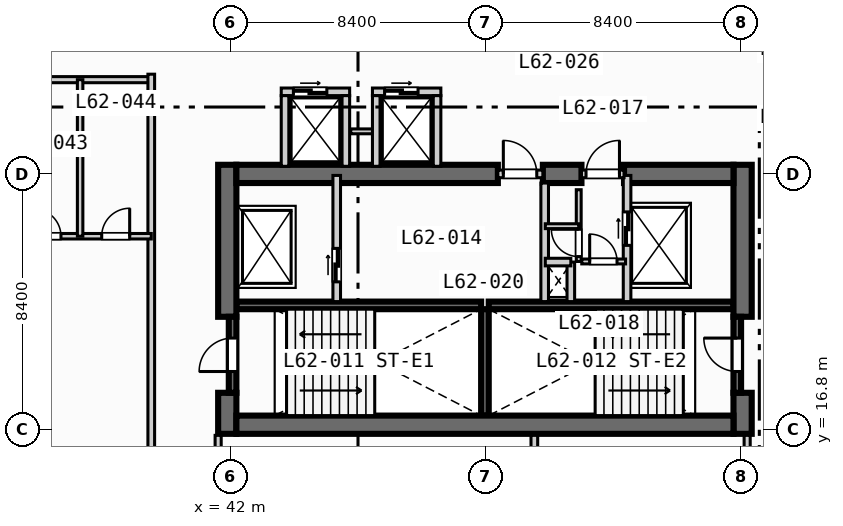
"""IFC4 building model, lengths in metres.
Left out: names, types, materials, properties, quantities, classifications, styles, units other than length and angle.
Written with IfcOpenShell. Run it as: python <this file> out.ifc"""

import sys

from ifc_helpers import new_model, si_unit, direction, frame, frame_2d, origin, place, context, subcontext, project, spatial, rectangle, extrude, element, fill, save


model = new_model("IFC4")
c1 = context("Model", 3, precision=1e-05, world=origin(), true_north=direction((0.0, 1.0)))
c2 = subcontext(c1, "Body", "Model", "MODEL_VIEW")
j1 = project(units=[si_unit("LENGTHUNIT", "METRE"), si_unit("PLANEANGLEUNIT", "RADIAN")], contexts=[c1])
p1 = place(None, origin())
s1 = spatial("IfcSite", under=j1, at=p1, CompositionType="ELEMENT")
p2 = place(p1, origin())
s2 = spatial("IfcBuilding", under=s1, at=p2, CompositionType="ELEMENT")
p3 = place(p2, frame((0.0, 0.0, 252.7)))
s3 = spatial("IfcBuildingStorey", under=s2, at=p3, CompositionType="ELEMENT", Elevation=252.7)
for number, where, z_axis, x_axis in (
    (1, (42.2, 20.875, 0.0), (0.0, 0.0, 1.0), (1.0, 0.0, 0.0)),
    (2, (50.5, 20.875, 0.0), (0.0, 0.0, 1.0), (1.0, 0.0, 0.0)),
):
    element("IfcWall", number, at=place(p3, frame(where, z_axis=z_axis, x_axis=x_axis)), inside=s3, PredefinedType="SOLIDWALL", context=c2, shape_type="SweptSolid", body=[
        extrude(rectangle(XDim=8.05, YDim=0.25, at=frame_2d((4.025, 0.0))), origin(), (0.0, 0.0, 1.0), 3.47),
    ])
p4 = place(p3, frame((50.375, 17.25, 0.0), z_axis=(0.0, 0.0, 1.0), x_axis=(0.0, 1.0, 0.0)))
e3 = element("IfcWall", 3, at=p4, inside=s3, PredefinedType="SOLIDWALL", context=c2, shape_type="SweptSolid", body=[
    extrude(rectangle(XDim=3.5, YDim=0.25, at=frame_2d((1.75, 0.0))), origin(), (0.0, 0.0, 1.0), 3.47),
])
p5 = place(p3, frame((41.9, 16.65, 0.0), z_axis=(0.0, 0.0, 1.0), x_axis=(0.0, 1.0, 0.0)))
e4 = element("IfcWall", 4, at=p5, inside=s3, PredefinedType="SHEAR", context=c2, shape_type="SweptSolid", body=[
    extrude(rectangle(XDim=1.35, YDim=0.6, at=frame_2d((0.675, 0.0))), origin(), (0.0, 0.0, 1.0), 3.47),
])
p6 = place(p3, frame((41.9, 20.5, 0.0), z_axis=(0.0, 0.0, 1.0), x_axis=(0.0, 1.0, 0.0)))
e5 = element("IfcWall", 5, at=p6, inside=s3, PredefinedType="SHEAR", context=c2, shape_type="SweptSolid", body=[
    extrude(rectangle(XDim=5.0, YDim=0.6, at=frame_2d((2.5, 0.0))), origin(), (0.0, 0.0, 1.0), 3.47),
])
p7 = place(p3, frame((58.85, 16.65, 0.0), z_axis=(0.0, 0.0, 1.0), x_axis=(0.0, 1.0, 0.0)))
e6 = element("IfcWall", 6, at=p7, inside=s3, PredefinedType="SHEAR", context=c2, shape_type="SweptSolid", body=[
    extrude(rectangle(XDim=1.35, YDim=0.6, at=frame_2d((0.675, 0.0))), origin(), (0.0, 0.0, 1.0), 3.47),
])
p8 = place(p3, frame((58.85, 20.5, 0.0), z_axis=(0.0, 0.0, 1.0), x_axis=(0.0, 1.0, 0.0)))
e7 = element("IfcWall", 7, at=p8, inside=s3, PredefinedType="SHEAR", context=c2, shape_type="SweptSolid", body=[
    extrude(rectangle(XDim=5.0, YDim=0.6, at=frame_2d((2.5, 0.0))), origin(), (0.0, 0.0, 1.0), 3.47),
])
p9 = place(p3, frame((42.2, 16.95, 0.0), z_axis=(0.0, 0.0, 1.0), x_axis=(1.0, 0.0, 0.0)))
e8 = element("IfcWall", 8, at=p9, inside=s3, PredefinedType="SHEAR", context=c2, shape_type="SweptSolid", body=[
    extrude(rectangle(XDim=16.35, YDim=0.6, at=frame_2d((8.175, 0.0))), origin(), (0.0, 0.0, 1.0), 3.47),
])
p10 = place(p3, frame((42.2, 25.2, 0.0), z_axis=(0.0, 0.0, 1.0), x_axis=(1.0, 0.0, 0.0)))
e9 = element("IfcWall", 9, at=p10, inside=s3, PredefinedType="SHEAR", context=c2, shape_type="SweptSolid", body=[
    extrude(rectangle(XDim=8.6, YDim=0.6, at=frame_2d((4.3, 0.0))), origin(), (0.0, 0.0, 1.0), 3.47),
])
p11 = place(p3, frame((52.28, 25.2, 0.0), z_axis=(0.0, 0.0, 1.0), x_axis=(1.0, 0.0, 0.0)))
e10 = element("IfcWall", 10, at=p11, inside=s3, PredefinedType="SHEAR", context=c2, shape_type="SweptSolid", body=[
    extrude(rectangle(XDim=1.27, YDim=0.6, at=frame_2d((0.635, 0.0))), origin(), (0.0, 0.0, 1.0), 3.47),
])
p12 = place(p3, frame((54.95, 25.2, 0.0), z_axis=(0.0, 0.0, 1.0), x_axis=(1.0, 0.0, 0.0)))
e11 = element("IfcWall", 11, at=p12, inside=s3, PredefinedType="SHEAR", context=c2, shape_type="SweptSolid", body=[
    extrude(rectangle(XDim=3.6, YDim=0.6, at=frame_2d((1.8, 0.0))), origin(), (0.0, 0.0, 1.0), 3.47),
])
p13 = place(p3, frame((42.075, 18.0, 0.0), z_axis=(0.0, 0.0, 1.0), x_axis=(0.0, 1.0, 0.0)))
e12 = element("IfcWall", 12, at=p13, inside=s3, PredefinedType="SOLIDWALL", context=c2, shape_type="SweptSolid", body=[
    extrude(rectangle(XDim=2.5, YDim=0.25, at=frame_2d((1.25, 0.0))), origin(), (0.0, 0.0, 1.0), 3.47),
])
p14 = place(p13, frame((0.7, 0.0, 0.0)))
e13 = element("IfcOpeningElement", 13, at=p14, cuts=e12, PredefinedType="OPENING", context=c2, shape_type="SweptSolid", body=[
    extrude(rectangle(XDim=1.1, YDim=2.15, at=frame_2d((0.55, 1.075))), frame((0.0, 0.135, 0.0), z_axis=(0.0, -1.0, 0.0), x_axis=(1.0, 0.0, 0.0)), (0.0, 0.0, 1.0), 0.27),
])
p15 = place(p3, frame((58.675, 18.0, 0.0), z_axis=(0.0, 0.0, 1.0), x_axis=(0.0, 1.0, 0.0)))
e14 = element("IfcWall", 14, at=p15, inside=s3, PredefinedType="SOLIDWALL", context=c2, shape_type="SweptSolid", body=[
    extrude(rectangle(XDim=2.5, YDim=0.25, at=frame_2d((1.25, 0.0))), origin(), (0.0, 0.0, 1.0), 3.47),
])
p16 = place(p15, frame((0.7, 0.0, 0.0)))
e15 = element("IfcOpeningElement", 15, at=p16, cuts=e14, PredefinedType="OPENING", context=c2, shape_type="SweptSolid", body=[
    extrude(rectangle(XDim=1.1, YDim=2.15, at=frame_2d((0.55, 1.075))), frame((0.0, 0.135, 0.0), z_axis=(0.0, -1.0, 0.0), x_axis=(1.0, 0.0, 0.0)), (0.0, 0.0, 1.0), 0.27),
])
p17 = place(p3, frame((45.5, 21.0, 0.0), z_axis=(0.0, 0.0, 1.0), x_axis=(0.0, 1.0, 0.0)))
e16 = element("IfcWall", 16, at=p17, inside=s3, PredefinedType="SOLIDWALL", context=c2, shape_type="SweptSolid", body=[
    extrude(rectangle(XDim=4.15, YDim=0.25, at=frame_2d((2.075, 0.0))), origin(), (0.0, 0.0, 1.0), 3.47),
])
p18 = place(p17, frame((0.65, 0.0, 0.0)))
e17 = element("IfcOpeningElement", 17, at=p18, cuts=e16, PredefinedType="OPENING", context=c2, shape_type="SweptSolid", body=[
    extrude(rectangle(XDim=1.1, YDim=2.15, at=frame_2d((0.55, 1.075))), frame((0.0, 0.135, 0.0), z_axis=(0.0, -1.0, 0.0), x_axis=(1.0, 0.0, 0.0)), (0.0, 0.0, 1.0), 0.27),
])
p19 = place(p3, frame((50.8, 25.2, 0.0), z_axis=(0.0, 0.0, 1.0), x_axis=(1.0, 0.0, 0.0)))
e18 = element("IfcWall", 18, at=p19, inside=s3, PredefinedType="SOLIDWALL", context=c2, shape_type="SweptSolid", body=[
    extrude(rectangle(XDim=1.48, YDim=0.25, at=frame_2d((0.74, 0.0))), origin(), (0.0, 0.0, 1.0), 3.47),
])
p20 = place(p19, frame((0.18, 0.0, 0.0)))
e19 = element("IfcOpeningElement", 19, at=p20, cuts=e18, PredefinedType="OPENING", context=c2, shape_type="SweptSolid", body=[
    extrude(rectangle(XDim=1.1, YDim=2.15, at=frame_2d((0.55, 1.075))), frame((0.0, 0.135, 0.0), z_axis=(0.0, -1.0, 0.0), x_axis=(1.0, 0.0, 0.0)), (0.0, 0.0, 1.0), 0.27),
])
p21 = place(p3, frame((52.34, 21.0, 0.0), z_axis=(0.0, 0.0, 1.0), x_axis=(0.0, 1.0, 0.0)))
e20 = element("IfcWall", 20, at=p21, inside=s3, PredefinedType="SOLIDWALL", context=c2, shape_type="SweptSolid", body=[
    extrude(rectangle(XDim=3.9, YDim=0.25, at=frame_2d((1.95, 0.0))), origin(), (0.0, 0.0, 1.0), 3.47),
])
p22 = place(p3, frame((55.05, 21.0, 0.0), z_axis=(0.0, 0.0, 1.0), x_axis=(0.0, 1.0, 0.0)))
e21 = element("IfcWall", 21, at=p22, inside=s3, PredefinedType="SOLIDWALL", context=c2, shape_type="SweptSolid", body=[
    extrude(rectangle(XDim=4.15, YDim=0.25, at=frame_2d((2.075, 0.0))), origin(), (0.0, 0.0, 1.0), 3.47),
])
p23 = place(p22, frame((1.85, 0.0, 0.0)))
e22 = element("IfcOpeningElement", 22, at=p23, cuts=e21, PredefinedType="OPENING", context=c2, shape_type="SweptSolid", body=[
    extrude(rectangle(XDim=1.1, YDim=2.15, at=frame_2d((0.55, 1.075))), frame((0.0, 0.135, 0.0), z_axis=(0.0, -1.0, 0.0), x_axis=(1.0, 0.0, 0.0)), (0.0, 0.0, 1.0), 0.27),
])
p24 = place(p3, frame((53.55, 25.2, 0.0), z_axis=(0.0, 0.0, 1.0), x_axis=(1.0, 0.0, 0.0)))
e23 = element("IfcWall", 23, at=p24, inside=s3, PredefinedType="SOLIDWALL", context=c2, shape_type="SweptSolid", body=[
    extrude(rectangle(XDim=1.4, YDim=0.25, at=frame_2d((0.7, 0.0))), origin(), (0.0, 0.0, 1.0), 3.47),
])
p25 = place(p24, frame((0.15, 0.0, 0.0)))
e24 = element("IfcOpeningElement", 24, at=p25, cuts=e23, PredefinedType="OPENING", context=c2, shape_type="SweptSolid", body=[
    extrude(rectangle(XDim=1.1, YDim=2.15, at=frame_2d((0.55, 1.075))), frame((0.0, 0.135, 0.0), z_axis=(0.0, -1.0, 0.0), x_axis=(1.0, 0.0, 0.0)), (0.0, 0.0, 1.0), 0.27),
])
p26 = place(p3, frame((53.2, 21.0, 0.0), z_axis=(0.0, 0.0, 1.0), x_axis=(0.0, 1.0, 0.0)))
e25 = element("IfcWall", 25, at=p26, inside=s3, PredefinedType="SOLIDWALL", context=c2, shape_type="SweptSolid", body=[
    extrude(rectangle(XDim=1.3, YDim=0.25, at=frame_2d((0.65, 0.0))), origin(), (0.0, 0.0, 1.0), 3.47),
])
p27 = place(p3, frame((52.36, 22.3, 0.0), z_axis=(0.0, 0.0, 1.0), x_axis=(1.0, 0.0, 0.0)))
e26 = element("IfcWall", 26, at=p27, inside=s3, PredefinedType="SOLIDWALL", context=c2, shape_type="SweptSolid", body=[
    extrude(rectangle(XDim=0.84, YDim=0.25, at=frame_2d((0.42, 0.0))), origin(), (0.0, 0.0, 1.0), 3.47),
])
p28 = place(p3, frame((53.56, 22.32, 0.0), z_axis=(0.0, 0.0, 1.0), x_axis=(1.0, 0.0, 0.0)))
e27 = element("IfcWall", 27, at=p28, inside=s3, PredefinedType="PARTITIONING", context=c2, shape_type="SweptSolid", body=[
    extrude(rectangle(XDim=1.44, YDim=0.16, at=frame_2d((0.72, 0.0))), origin(), (0.0, 0.0, 1.0), 3.47),
])
p29 = place(p28, frame((0.26, 0.0, 0.0)))
e28 = element("IfcOpeningElement", 28, at=p29, cuts=e27, PredefinedType="OPENING", context=c2, shape_type="SweptSolid", body=[
    extrude(rectangle(XDim=0.9, YDim=2.1, at=frame_2d((0.45, 1.05))), frame((0.0, 0.09, 0.0), z_axis=(0.0, -1.0, 0.0), x_axis=(1.0, 0.0, 0.0)), (0.0, 0.0, 1.0), 0.18),
])
p30 = place(p3, frame((53.46, 22.32, 0.0), z_axis=(0.0, 0.0, 1.0), x_axis=(0.0, 1.0, 0.0)))
e29 = element("IfcWall", 29, at=p30, inside=s3, PredefinedType="PARTITIONING", context=c2, shape_type="SweptSolid", body=[
    extrude(rectangle(XDim=2.36, YDim=0.16, at=frame_2d((1.18, 0.0))), origin(), (0.0, 0.0, 1.0), 3.47),
])
p31 = place(p30, frame((0.16, 0.0, 0.0)))
e30 = element("IfcOpeningElement", 30, at=p31, cuts=e29, PredefinedType="OPENING", context=c2, shape_type="SweptSolid", body=[
    extrude(rectangle(XDim=0.9, YDim=2.1, at=frame_2d((0.45, 1.05))), frame((0.0, 0.09, 0.0), z_axis=(0.0, -1.0, 0.0), x_axis=(1.0, 0.0, 0.0)), (0.0, 0.0, 1.0), 0.18),
])
p32 = place(p3, frame((52.36, 23.48, 0.0), z_axis=(0.0, 0.0, 1.0), x_axis=(1.0, 0.0, 0.0)))
e31 = element("IfcWall", 31, at=p32, inside=s3, PredefinedType="PARTITIONING", context=c2, shape_type="SweptSolid", body=[
    extrude(rectangle(XDim=1.1, YDim=0.16, at=frame_2d((0.55, 0.0))), origin(), (0.0, 0.0, 1.0), 3.47),
])
p33 = place(p3, frame((43.675, 27.9, 0.0), z_axis=(0.0, 0.0, 1.0), x_axis=(1.0, 0.0, 0.0)))
e32 = element("IfcWall", 32, at=p33, inside=s3, PredefinedType="SOLIDWALL", context=c2, shape_type="SweptSolid", body=[
    extrude(rectangle(XDim=2.25, YDim=0.25, at=frame_2d((1.125, 0.0))), origin(), (0.0, 0.0, 1.0), 3.47),
])
p34 = place(p33, frame((0.4, 0.0, 0.0)))
e33 = element("IfcOpeningElement", 33, at=p34, cuts=e32, PredefinedType="OPENING", context=c2, shape_type="SweptSolid", body=[
    extrude(rectangle(XDim=1.1, YDim=2.15, at=frame_2d((0.55, 1.075))), frame((0.0, 0.135, 0.0), z_axis=(0.0, -1.0, 0.0), x_axis=(1.0, 0.0, 0.0)), (0.0, 0.0, 1.0), 0.27),
])
for number, where, z_axis, x_axis in (
    (34, (43.8, 25.45, 0.0), (0.0, 0.0, 1.0), (0.0, 1.0, 0.0)),
    (35, (45.8, 25.45, 0.0), (0.0, 0.0, 1.0), (0.0, 1.0, 0.0)),
):
    element("IfcWall", number, at=place(p3, frame(where, z_axis=z_axis, x_axis=x_axis)), inside=s3, PredefinedType="SOLIDWALL", context=c2, shape_type="SweptSolid", body=[
        extrude(rectangle(XDim=2.325, YDim=0.25, at=frame_2d((1.163, 0.0))), origin(), (0.0, 0.0, 1.0), 3.47),
    ])
p35 = place(p3, frame((45.96, 26.6, 0.0), z_axis=(0.0, 0.0, 1.0), x_axis=(1.0, 0.0, 0.0)))
e36 = element("IfcWall", 36, at=p35, inside=s3, PredefinedType="PARTITIONING", context=c2, shape_type="SweptSolid", body=[
    extrude(rectangle(XDim=0.88, YDim=0.16, at=frame_2d((0.44, 0.0))), origin(), (0.0, 0.0, 1.0), 3.47),
])
p36 = place(p3, frame((46.675, 27.9, 0.0), z_axis=(0.0, 0.0, 1.0), x_axis=(1.0, 0.0, 0.0)))
e37 = element("IfcWall", 37, at=p36, inside=s3, PredefinedType="SOLIDWALL", context=c2, shape_type="SweptSolid", body=[
    extrude(rectangle(XDim=2.25, YDim=0.25, at=frame_2d((1.125, 0.0))), origin(), (0.0, 0.0, 1.0), 3.47),
])
p37 = place(p36, frame((0.4, 0.0, 0.0)))
e38 = element("IfcOpeningElement", 38, at=p37, cuts=e37, PredefinedType="OPENING", context=c2, shape_type="SweptSolid", body=[
    extrude(rectangle(XDim=1.1, YDim=2.15, at=frame_2d((0.55, 1.075))), frame((0.0, 0.135, 0.0), z_axis=(0.0, -1.0, 0.0), x_axis=(1.0, 0.0, 0.0)), (0.0, 0.0, 1.0), 0.27),
])
for number, where, z_axis, x_axis in (
    (39, (46.8, 25.45, 0.0), (0.0, 0.0, 1.0), (0.0, 1.0, 0.0)),
    (40, (48.8, 25.45, 0.0), (0.0, 0.0, 1.0), (0.0, 1.0, 0.0)),
):
    element("IfcWall", number, at=place(p3, frame(where, z_axis=z_axis, x_axis=x_axis)), inside=s3, PredefinedType="SOLIDWALL", context=c2, shape_type="SweptSolid", body=[
        extrude(rectangle(XDim=2.325, YDim=0.25, at=frame_2d((1.163, 0.0))), origin(), (0.0, 0.0, 1.0), 3.47),
    ])
p38 = place(p3, frame((41.6, 8.65, 0.0), z_axis=(0.0, 0.0, 1.0), x_axis=(0.0, 1.0, 0.0)))
e41 = element("IfcWall", 41, at=p38, inside=s3, PredefinedType="PARTITIONING", context=c2, shape_type="SweptSolid", body=[
    extrude(rectangle(XDim=7.95, YDim=0.2, at=frame_2d((3.975, 0.0))), origin(), (0.0, 0.0, 1.0), 3.47),
])
p39 = place(p38, frame((2.2, 0.0, 0.0)))
e42 = element("IfcOpeningElement", 42, at=p39, cuts=e41, PredefinedType="OPENING", context=c2, shape_type="SweptSolid", body=[
    extrude(rectangle(XDim=0.92, YDim=2.1, at=frame_2d((0.46, 1.05))), frame((0.0, 0.11, 0.0), z_axis=(0.0, -1.0, 0.0), x_axis=(1.0, 0.0, 0.0)), (0.0, 0.0, 1.0), 0.22),
])
p40 = place(p3, frame((59.0, 8.65, 0.0), z_axis=(0.0, 0.0, 1.0), x_axis=(0.0, 1.0, 0.0)))
e43 = element("IfcWall", 43, at=p40, inside=s3, PredefinedType="PARTITIONING", context=c2, shape_type="SweptSolid", body=[
    extrude(rectangle(XDim=7.95, YDim=0.2, at=frame_2d((3.975, 0.0))), origin(), (0.0, 0.0, 1.0), 2.859),
])
p41 = place(p40, frame((2.2, 0.0, 0.0)))
e44 = element("IfcOpeningElement", 44, at=p41, cuts=e43, PredefinedType="OPENING", context=c2, shape_type="SweptSolid", body=[
    extrude(rectangle(XDim=0.92, YDim=2.1, at=frame_2d((0.46, 1.05))), frame((0.0, 0.11, 0.0), z_axis=(0.0, -1.0, 0.0), x_axis=(1.0, 0.0, 0.0)), (0.0, 0.0, 1.0), 0.22),
])
p42 = place(p3, frame((52.0, 8.65, 0.0), z_axis=(0.0, 0.0, 1.0), x_axis=(0.0, 1.0, 0.0)))
e45 = element("IfcWall", 45, at=p42, inside=s3, PredefinedType="PARTITIONING", context=c2, shape_type="SweptSolid", body=[
    extrude(rectangle(XDim=7.95, YDim=0.22, at=frame_2d((3.975, 0.0))), origin(), (0.0, 0.0, 1.0), 3.47),
])
p43 = place(p3, frame((11.8, 28.3, 0.0), z_axis=(0.0, 0.0, 1.0), x_axis=(1.0, 0.0, 0.0)))
e46 = element("IfcWall", 46, at=p43, inside=s3, PredefinedType="PARTITIONING", context=c2, shape_type="SweptSolid", body=[
    extrude(rectangle(XDim=27.6, YDim=0.2, at=frame_2d((13.8, 0.0))), origin(), (0.0, 0.0, 1.0), 3.47),
])
p44 = place(p43, frame((3.92, 0.0, 0.0)))
e47 = element("IfcOpeningElement", 47, at=p44, cuts=e46, PredefinedType="OPENING", context=c2, shape_type="SweptSolid", body=[
    extrude(rectangle(XDim=1.0, YDim=2.15, at=frame_2d((0.5, 1.075))), frame((0.0, 0.11, 0.0), z_axis=(0.0, -1.0, 0.0), x_axis=(1.0, 0.0, 0.0)), (0.0, 0.0, 1.0), 0.22),
])
p45 = place(p43, frame((12.57, 0.0, 0.0)))
e48 = element("IfcOpeningElement", 48, at=p45, cuts=e46, PredefinedType="OPENING", context=c2, shape_type="SweptSolid", body=[
    extrude(rectangle(XDim=1.0, YDim=2.15, at=frame_2d((0.5, 1.075))), frame((0.0, 0.11, 0.0), z_axis=(0.0, -1.0, 0.0), x_axis=(1.0, 0.0, 0.0)), (0.0, 0.0, 1.0), 0.22),
])
p46 = place(p43, frame((20.77, 0.0, 0.0)))
e49 = element("IfcOpeningElement", 49, at=p46, cuts=e46, PredefinedType="OPENING", context=c2, shape_type="SweptSolid", body=[
    extrude(rectangle(XDim=1.0, YDim=2.15, at=frame_2d((0.5, 1.075))), frame((0.0, 0.11, 0.0), z_axis=(0.0, -1.0, 0.0), x_axis=(1.0, 0.0, 0.0)), (0.0, 0.0, 1.0), 0.22),
])
p47 = place(p3, frame((39.4, 8.6, 0.0), z_axis=(0.0, 0.0, 1.0), x_axis=(0.0, 1.0, 0.0)))
e50 = element("IfcWall", 50, at=p47, inside=s3, PredefinedType="PARTITIONING", context=c2, shape_type="SweptSolid", body=[
    extrude(rectangle(XDim=19.88, YDim=0.22, at=frame_2d((9.94, 0.0))), origin(), (0.0, 0.0, 1.0), 3.47),
])
p48 = place(p3, frame((34.9, 23.15, 0.0), z_axis=(0.0, 0.0, 1.0), x_axis=(1.0, 0.0, 0.0)))
e51 = element("IfcWall", 51, at=p48, inside=s3, PredefinedType="PLUMBINGWALL", context=c2, shape_type="SweptSolid", body=[
    extrude(rectangle(XDim=4.5, YDim=0.18, at=frame_2d((2.25, 0.0))), origin(), (0.0, 0.0, 1.0), 3.47),
])
p49 = place(p48, frame((0.63, 0.0, 0.0)))
e52 = element("IfcOpeningElement", 52, at=p49, cuts=e51, PredefinedType="OPENING", context=c2, shape_type="SweptSolid", body=[
    extrude(rectangle(XDim=0.9, YDim=2.1, at=frame_2d((0.45, 1.05))), frame((0.0, 0.1, 0.0), z_axis=(0.0, -1.0, 0.0), x_axis=(1.0, 0.0, 0.0)), (0.0, 0.0, 1.0), 0.2),
])
p50 = place(p48, frame((2.87, 0.0, 0.0)))
e53 = element("IfcOpeningElement", 53, at=p50, cuts=e51, PredefinedType="OPENING", context=c2, shape_type="SweptSolid", body=[
    extrude(rectangle(XDim=0.92, YDim=2.1, at=frame_2d((0.46, 1.05))), frame((0.0, 0.1, 0.0), z_axis=(0.0, -1.0, 0.0), x_axis=(1.0, 0.0, 0.0)), (0.0, 0.0, 1.0), 0.2),
])
p51 = place(p3, frame((37.06, 23.15, 0.0), z_axis=(0.0, 0.0, 1.0), x_axis=(0.0, 1.0, 0.0)))
e54 = element("IfcWall", 54, at=p51, inside=s3, PredefinedType="PLUMBINGWALL", context=c2, shape_type="SweptSolid", body=[
    extrude(rectangle(XDim=5.15, YDim=0.18, at=frame_2d((2.575, 0.0))), origin(), (0.0, 0.0, 1.0), 3.47),
])
p52 = place(p14, origin())
e55 = element("IfcDoor", 55, at=p52, inside=s3, OperationType="SINGLE_SWING_LEFT", PredefinedType="DOOR", context=c2, shape_type="SweptSolid", body=[
    extrude(rectangle(XDim=1.1, YDim=2.15, at=frame_2d((0.55, 1.075))), frame((0.0, 0.025, 0.0), z_axis=(0.0, -1.0, 0.0), x_axis=(1.0, 0.0, 0.0)), (0.0, 0.0, 1.0), 0.05),
])
fill(e13, e55)
p53 = place(p16, origin())
e56 = element("IfcDoor", 56, at=p53, inside=s3, OperationType="SINGLE_SWING_RIGHT", PredefinedType="DOOR", context=c2, shape_type="SweptSolid", body=[
    extrude(rectangle(XDim=1.1, YDim=2.15, at=frame_2d((0.55, 1.075))), frame((0.0, 0.025, 0.0), z_axis=(0.0, -1.0, 0.0), x_axis=(1.0, 0.0, 0.0)), (0.0, 0.0, 1.0), 0.05),
])
fill(e15, e56)
p54 = place(p18, origin())
e57 = element("IfcDoor", 57, at=p54, inside=s3, OperationType="SLIDING_TO_LEFT", PredefinedType="DOOR", context=c2, shape_type="SweptSolid", body=[
    extrude(rectangle(XDim=1.1, YDim=2.15, at=frame_2d((0.55, 1.075))), frame((0.0, 0.025, 0.0), z_axis=(0.0, -1.0, 0.0), x_axis=(1.0, 0.0, 0.0)), (0.0, 0.0, 1.0), 0.05),
])
fill(e17, e57)
p55 = place(p20, origin())
e58 = element("IfcDoor", 58, at=p55, inside=s3, OperationType="SINGLE_SWING_LEFT", PredefinedType="DOOR", context=c2, shape_type="SweptSolid", body=[
    extrude(rectangle(XDim=1.1, YDim=2.15, at=frame_2d((0.55, 1.075))), frame((0.0, 0.025, 0.0), z_axis=(0.0, -1.0, 0.0), x_axis=(1.0, 0.0, 0.0)), (0.0, 0.0, 1.0), 0.05),
])
fill(e19, e58)
p56 = place(p23, origin())
e59 = element("IfcDoor", 59, at=p56, inside=s3, OperationType="SLIDING_TO_LEFT", PredefinedType="DOOR", context=c2, shape_type="SweptSolid", body=[
    extrude(rectangle(XDim=1.1, YDim=2.15, at=frame_2d((0.55, 1.075))), frame((0.0, 0.025, 0.0), z_axis=(0.0, -1.0, 0.0), x_axis=(1.0, 0.0, 0.0)), (0.0, 0.0, 1.0), 0.05),
])
fill(e22, e59)
p57 = place(p25, origin())
e60 = element("IfcDoor", 60, at=p57, inside=s3, OperationType="SINGLE_SWING_RIGHT", PredefinedType="DOOR", context=c2, shape_type="SweptSolid", body=[
    extrude(rectangle(XDim=1.1, YDim=2.15, at=frame_2d((0.55, 1.075))), frame((0.0, 0.025, 0.0), z_axis=(0.0, -1.0, 0.0), x_axis=(1.0, 0.0, 0.0)), (0.0, 0.0, 1.0), 0.05),
])
fill(e24, e60)
p58 = place(p29, origin())
e61 = element("IfcDoor", 61, at=p58, inside=s3, OperationType="SINGLE_SWING_LEFT", PredefinedType="DOOR", context=c2, shape_type="SweptSolid", body=[
    extrude(rectangle(XDim=0.9, YDim=2.1, at=frame_2d((0.45, 1.05))), frame((0.0, 0.025, 0.0), z_axis=(0.0, -1.0, 0.0), x_axis=(1.0, 0.0, 0.0)), (0.0, 0.0, 1.0), 0.05),
])
fill(e28, e61)
p59 = place(p31, origin())
e62 = element("IfcDoor", 62, at=p59, inside=s3, OperationType="SINGLE_SWING_RIGHT", PredefinedType="DOOR", context=c2, shape_type="SweptSolid", body=[
    extrude(rectangle(XDim=0.9, YDim=2.1, at=frame_2d((0.45, 1.05))), frame((0.0, 0.025, 0.0), z_axis=(0.0, -1.0, 0.0), x_axis=(1.0, 0.0, 0.0)), (0.0, 0.0, 1.0), 0.05),
])
fill(e30, e62)
p60 = place(p34, origin())
e63 = element("IfcDoor", 63, at=p60, inside=s3, OperationType="SLIDING_TO_LEFT", PredefinedType="DOOR", context=c2, shape_type="SweptSolid", body=[
    extrude(rectangle(XDim=1.1, YDim=2.15, at=frame_2d((0.55, 1.075))), frame((0.0, 0.025, 0.0), z_axis=(0.0, -1.0, 0.0), x_axis=(1.0, 0.0, 0.0)), (0.0, 0.0, 1.0), 0.05),
])
fill(e33, e63)
p61 = place(p37, origin())
e64 = element("IfcDoor", 64, at=p61, inside=s3, OperationType="SLIDING_TO_LEFT", PredefinedType="DOOR", context=c2, shape_type="SweptSolid", body=[
    extrude(rectangle(XDim=1.1, YDim=2.15, at=frame_2d((0.55, 1.075))), frame((0.0, 0.025, 0.0), z_axis=(0.0, -1.0, 0.0), x_axis=(1.0, 0.0, 0.0)), (0.0, 0.0, 1.0), 0.05),
])
fill(e38, e64)
p62 = place(p49, origin())
e65 = element("IfcDoor", 65, at=p62, inside=s3, OperationType="SINGLE_SWING_LEFT", PredefinedType="DOOR", context=c2, shape_type="SweptSolid", body=[
    extrude(rectangle(XDim=0.9, YDim=2.1, at=frame_2d((0.45, 1.05))), frame((0.0, 0.025, 0.0), z_axis=(0.0, -1.0, 0.0), x_axis=(1.0, 0.0, 0.0)), (0.0, 0.0, 1.0), 0.05),
])
fill(e52, e65)
p63 = place(p50, origin())
e66 = element("IfcDoor", 66, at=p63, inside=s3, OperationType="SINGLE_SWING_RIGHT", PredefinedType="DOOR", context=c2, shape_type="SweptSolid", body=[
    extrude(rectangle(XDim=0.92, YDim=2.1, at=frame_2d((0.46, 1.05))), frame((0.0, 0.025, 0.0), z_axis=(0.0, -1.0, 0.0), x_axis=(1.0, 0.0, 0.0)), (0.0, 0.0, 1.0), 0.05),
])
fill(e53, e66)
save(model, sys.argv[1])
